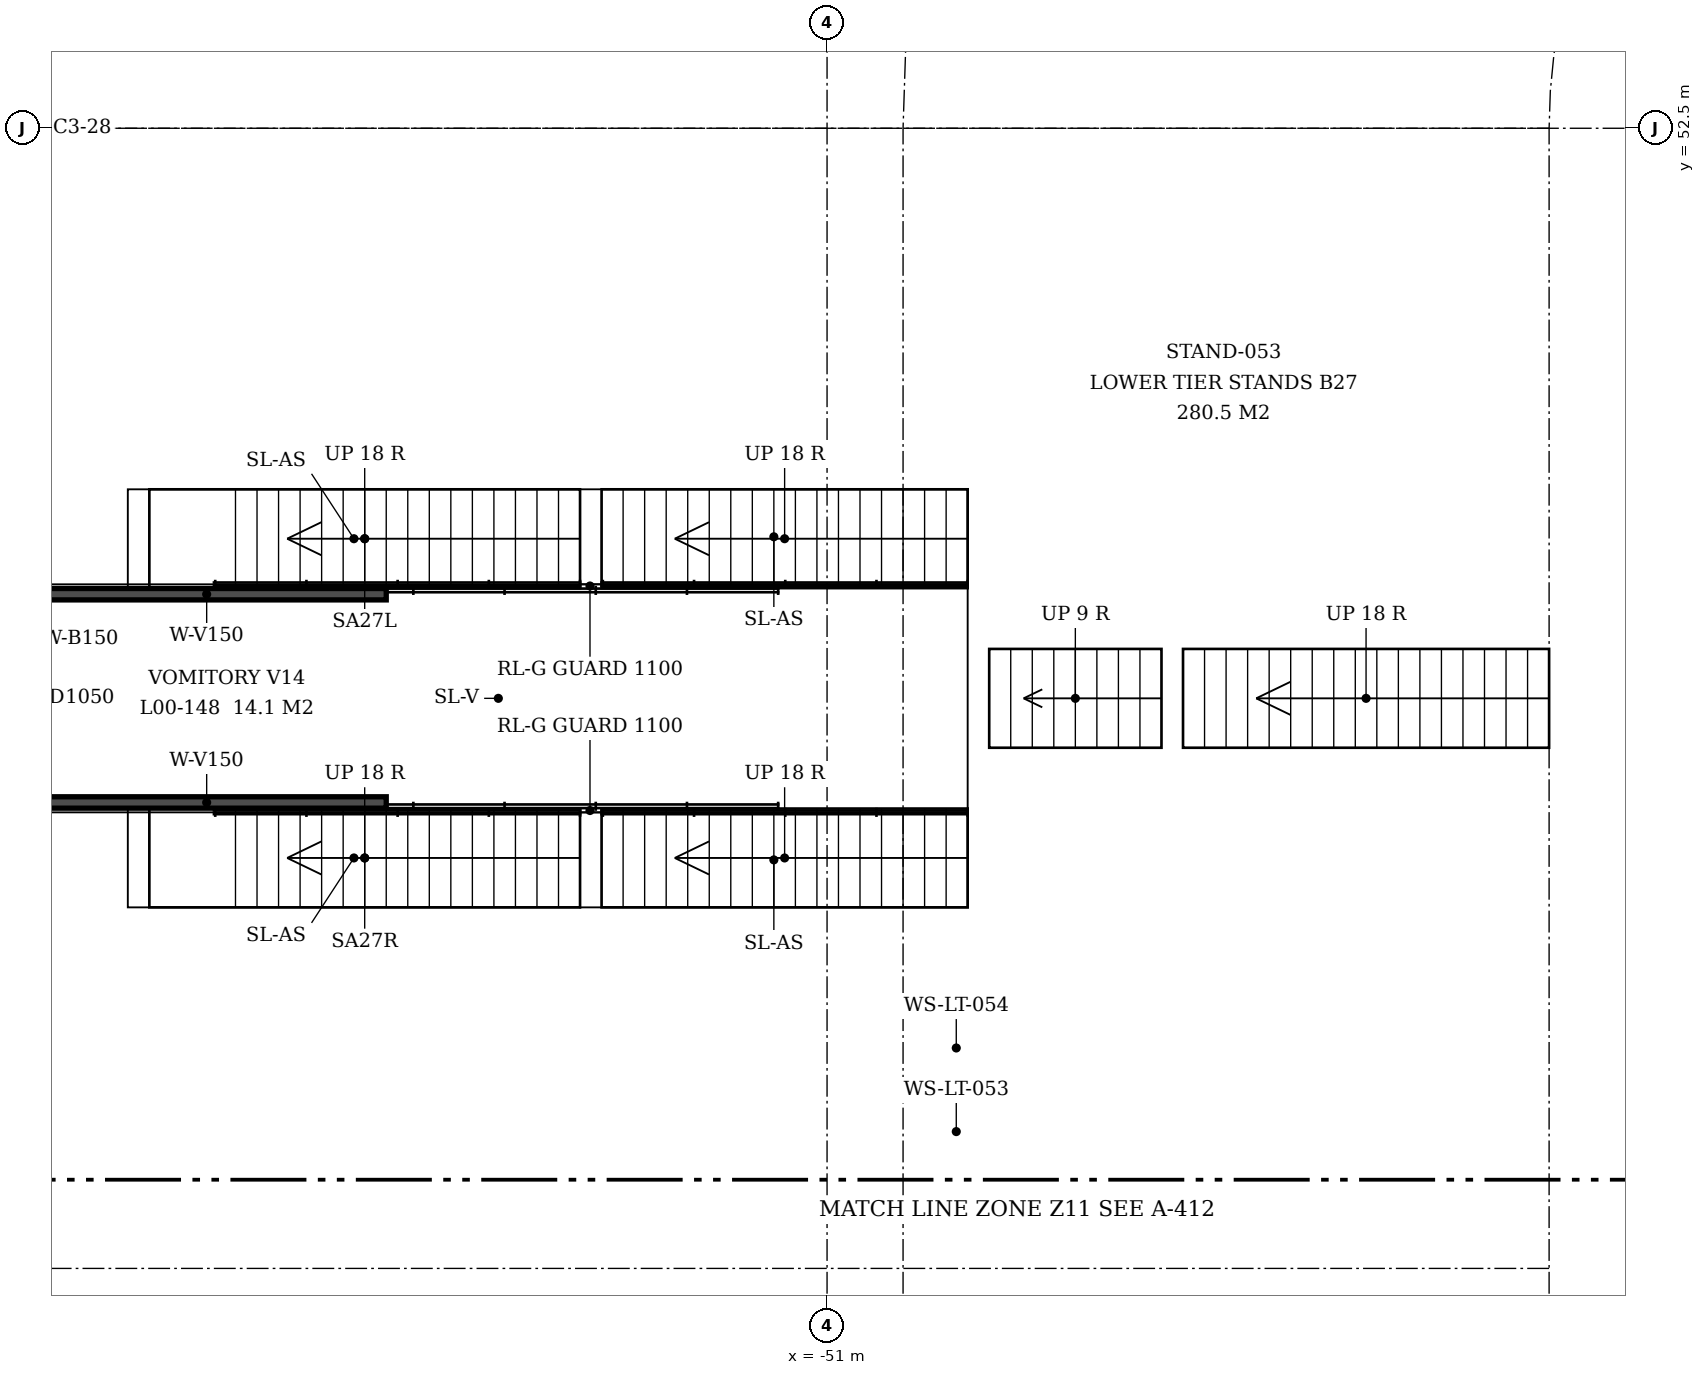
"""IFC4 building model, lengths in metres.
Left out: names, types, materials, properties, quantities, classifications, styles, units other than length and angle.
Written with IfcOpenShell. Run it as: python <this file> out.ifc"""

import sys

from ifc_helpers import new_model, si_unit, direction, frame, frame_2d, origin, place, context, subcontext, project, spatial, rectangle, extrude, element, save


model = new_model("IFC4")
c1 = context("Model", 3, precision=1e-05, world=origin(), true_north=direction((0.0, 1.0)))
c2 = subcontext(c1, "Body", "Model", "MODEL_VIEW")
j1 = project(units=[si_unit("LENGTHUNIT", "METRE"), si_unit("PLANEANGLEUNIT", "RADIAN")], contexts=[c1])
p1 = place(None, origin())
s1 = spatial("IfcSite", under=j1, at=p1, CompositionType="ELEMENT")
p2 = place(p1, origin())
s2 = spatial("IfcBuilding", under=s1, at=p2, CompositionType="ELEMENT")
p3 = place(p2, origin())
s3 = spatial("IfcBuildingStorey", under=s2, at=p3, CompositionType="ELEMENT", Elevation=0.0)
p4 = place(p3, frame((-61.5, 53.0, 0.0), z_axis=(0.0, 0.0, 1.0), x_axis=(0.195081244333, 0.980787086023, 0.0)))
e1 = element("IfcWall", 1, at=p4, inside=s3, PredefinedType="SOLIDWALL", context=c2, shape_type="SweptSolid", body=[
    extrude(rectangle(XDim=9.8, YDim=0.15, at=frame_2d((4.9, 0.0))), origin(), (0.0, 0.0, 1.0), 3.0),
])
for number, where, z_axis, x_axis in (
    (2, (-56.8, 46.37, 0.0), (0.0, 0.0, 1.0), (-1.0, 0.0, 0.0)),
    (3, (-56.8, 43.63, 0.0), (0.0, 0.0, 1.0), (-1.0, 0.0, 0.0)),
):
    element("IfcWall", number, at=place(p3, frame(where, z_axis=z_axis, x_axis=x_axis)), inside=s3, PredefinedType="SOLIDWALL", context=c2, shape_type="SweptSolid", body=[
        extrude(rectangle(XDim=4.725, YDim=0.15, at=frame_2d((2.362, 0.0))), origin(), (0.0, 0.0, 1.0), 2.75),
    ])
save(model, sys.argv[1])
